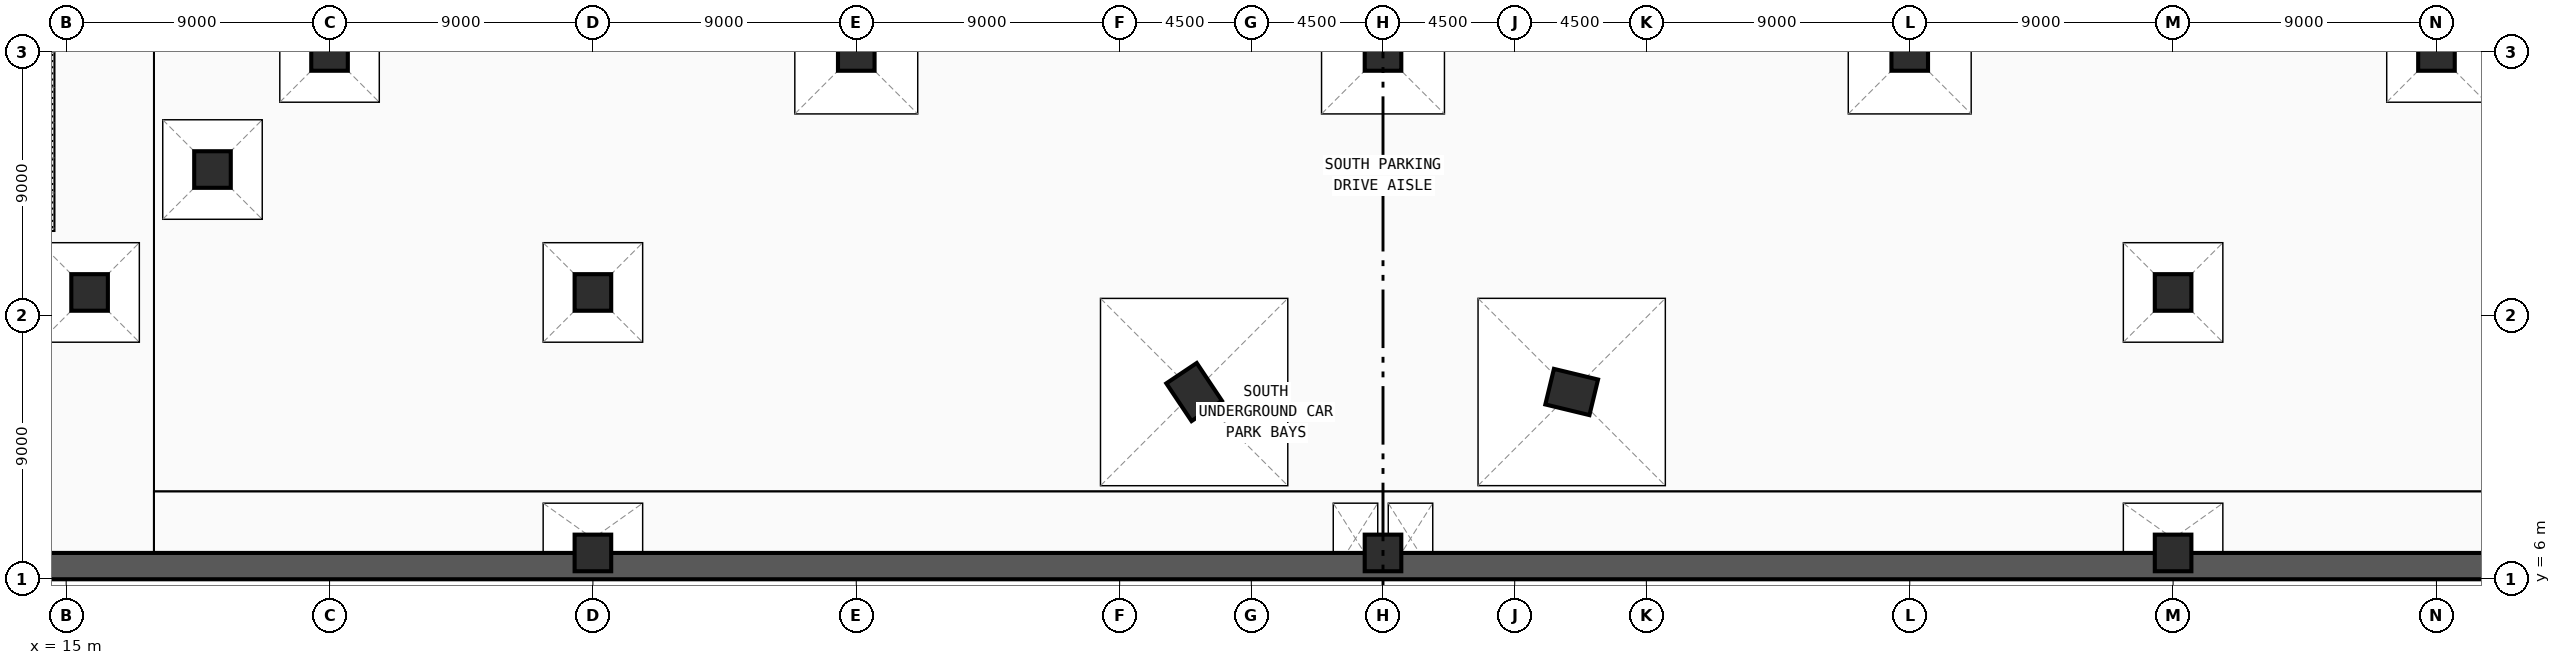
"""IFC4 building model, lengths in metres.
Left out: names, types, materials, properties, quantities, classifications, styles, units other than length and angle.
Written with IfcOpenShell. Run it as: python <this file> out.ifc"""

import sys

from ifc_helpers import new_model, si_unit, direction, frame, frame_2d, origin, origin_2d, place, context, subcontext, project, spatial, rectangle, extrude, source, transform, mapped, element, save


model = new_model("IFC4")
c1 = context("Model", 3, precision=1e-05, world=origin(), true_north=direction((0.0, 1.0)))
c2 = subcontext(c1, "Body", "Model", "MODEL_VIEW")
j1 = project(units=[si_unit("LENGTHUNIT", "METRE"), si_unit("PLANEANGLEUNIT", "RADIAN")], contexts=[c1])
p1 = place(None, origin())
s1 = spatial("IfcSite", under=j1, at=p1, CompositionType="ELEMENT")
p2 = place(p1, origin())
s2 = spatial("IfcBuilding", under=s1, at=p2, CompositionType="ELEMENT")
p3 = place(p2, frame((0.0, 0.0, -9.6)))
s3 = spatial("IfcBuildingStorey", under=s2, at=p3, CompositionType="ELEMENT", Elevation=-9.6)
m1 = source(origin(), c2, "Body", "SweptSolid", [
    extrude(rectangle(XDim=1.55, YDim=1.25, at=origin_2d()), origin(), (0.0, 0.0, 1.0), 4.8),
])
for number, where, z_axis, x_axis in (
    (1, (53.546, 12.397, 0.0), (0.0, 0.0, 1.0), (-0.556, 0.831, 0.0)),
    (2, (66.448, 12.399, 0.0), (0.0, 0.0, 1.0), (-0.972, 0.235, 0.0)),
):
    element("IfcColumn", number, at=place(p3, frame(where, z_axis=z_axis, x_axis=x_axis)), inside=s3, PredefinedType="COLUMN", context=c2, shape_type="MappedRepresentation", body=[
        mapped(m1, transform((0.0, 0.0, 0.0), x_axis=(1.0, 0.0, 0.0), y_axis=(0.0, 1.0, 0.0), z_axis=(0.0, 0.0, 1.0), scale=1.0)),
    ])
m2 = source(origin(), c2, "Body", "SweptSolid", [
    extrude(rectangle(XDim=1.25, YDim=1.25, at=origin_2d()), origin(), (0.0, 0.0, 1.0), 4.8),
])
for number, where, z_axis, x_axis in (
    (3, (24.0, 24.0, 0.0), (0.0, 0.0, 1.0), (1.0, 0.0, 0.0)),
    (4, (42.0, 24.0, 0.0), (0.0, 0.0, 1.0), (1.0, 0.0, 0.0)),
    (5, (60.0, 24.0, 0.0), (0.0, 0.0, 1.0), (1.0, 0.0, 0.0)),
    (6, (78.0, 24.0, 0.0), (0.0, 0.0, 1.0), (1.0, 0.0, 0.0)),
    (7, (96.0, 24.0, 0.0), (0.0, 0.0, 1.0), (1.0, 0.0, 0.0)),
    (8, (15.8, 15.8, 0.0), (0.0, 0.0, 1.0), (1.0, 0.0, 0.0)),
    (9, (33.0, 15.8, 0.0), (0.0, 0.0, 1.0), (1.0, 0.0, 0.0)),
    (10, (87.0, 15.8, 0.0), (0.0, 0.0, 1.0), (1.0, 0.0, 0.0)),
    (11, (20.0, 20.0, 0.0), (0.0, 0.0, 1.0), (1.0, 0.0, 0.0)),
    (12, (33.0, 6.9, 0.0), (0.0, 0.0, 1.0), (1.0, 0.0, 0.0)),
    (13, (60.0, 6.9, 0.0), (0.0, 0.0, 1.0), (1.0, 0.0, 0.0)),
    (14, (87.0, 6.9, 0.0), (0.0, 0.0, 1.0), (1.0, 0.0, 0.0)),
):
    element("IfcColumn", number, at=place(p3, frame(where, z_axis=z_axis, x_axis=x_axis)), inside=s3, PredefinedType="COLUMN", context=c2, shape_type="MappedRepresentation", body=[
        mapped(m2, transform((0.0, 0.0, 0.0), x_axis=(1.0, 0.0, 0.0), y_axis=(0.0, 1.0, 0.0), z_axis=(0.0, 0.0, 1.0), scale=1.0)),
    ])
p4 = place(p3, frame((113.1, 6.45, 0.0), z_axis=(0.0, 0.0, 1.0), x_axis=(-1.0, 0.0, 0.0)))
e15 = element("IfcWall", 15, at=p4, inside=s3, PredefinedType="USERDEFINED", context=c2, shape_type="SweptSolid", body=[
    extrude(rectangle(XDim=106.2, YDim=0.9, at=frame_2d((53.1, 0.0))), origin(), (0.0, 0.0, 1.0), 4.5),
])
save(model, sys.argv[1])
